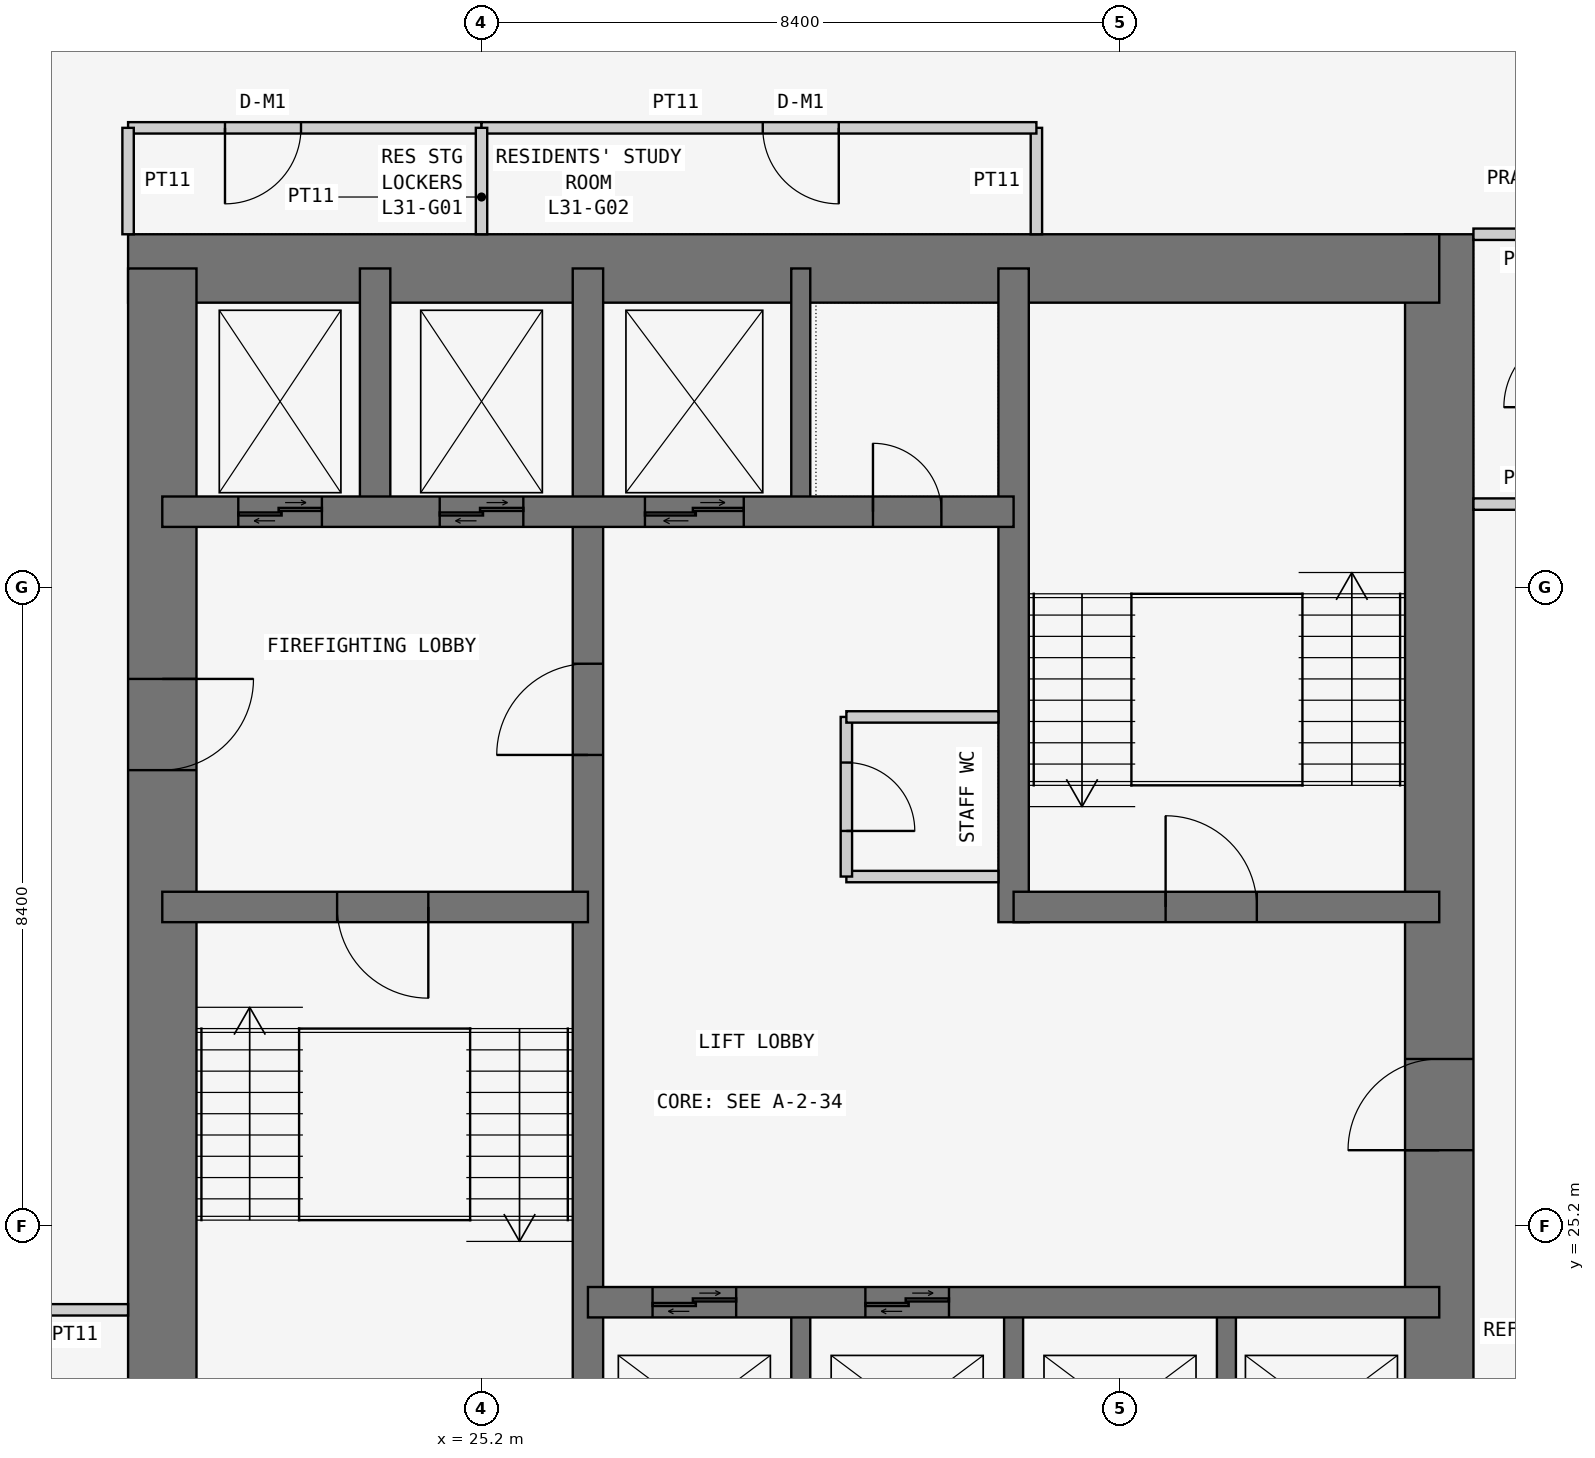
"""IFC4 building model, lengths in metres.
Left out: names, types, materials, properties, quantities, classifications, styles, units other than length and angle.
Written with IfcOpenShell. Run it as: python <this file> out.ifc"""

import sys

from ifc_helpers import new_model, si_unit, direction, frame, frame_2d, origin, place, context, subcontext, project, spatial, rectangle, extrude, element, fill, save


model = new_model("IFC4")
c1 = context("Model", 3, precision=1e-05, world=origin(), true_north=direction((0.0, 1.0)))
c2 = subcontext(c1, "Body", "Model", "MODEL_VIEW")
j1 = project(units=[si_unit("LENGTHUNIT", "METRE"), si_unit("PLANEANGLEUNIT", "RADIAN")], contexts=[c1])
p1 = place(None, origin())
s1 = spatial("IfcSite", under=j1, at=p1, CompositionType="ELEMENT")
p2 = place(p1, origin())
s2 = spatial("IfcBuilding", under=s1, at=p2, CompositionType="ELEMENT")
p3 = place(p2, frame((0.0, 0.0, 123.3)))
s3 = spatial("IfcBuildingStorey", under=s2, at=p3, CompositionType="ELEMENT", Elevation=123.3)
p4 = place(p3, frame((37.8, 21.0, 0.0), z_axis=(0.0, 0.0, 1.0), x_axis=(0.0, 1.0, 0.0)))
e1 = element("IfcWall", 1, at=p4, inside=s3, PredefinedType="SHEAR", context=c2, shape_type="SweptSolid", body=[
    extrude(rectangle(XDim=17.25, YDim=0.9, at=frame_2d((8.625, 0.0))), origin(), (0.0, 0.0, 1.0), 3.6),
])
p5 = place(p4, frame((5.2, 0.0, 0.0)))
e2 = element("IfcOpeningElement", 2, at=p5, cuts=e1, PredefinedType="OPENING", context=c2, shape_type="SweptSolid", body=[
    extrude(rectangle(XDim=1.2, YDim=2.1, at=frame_2d((0.6, 1.05))), frame((0.0, 0.46, 0.0), z_axis=(0.0, -1.0, 0.0), x_axis=(1.0, 0.0, 0.0)), (0.0, 0.0, 1.0), 0.92),
])
p6 = place(p3, frame((37.8, 37.8, 0.0), z_axis=(0.0, 0.0, 1.0), x_axis=(-1.0, 0.0, 0.0)))
e3 = element("IfcWall", 3, at=p6, inside=s3, PredefinedType="SHEAR", context=c2, shape_type="SweptSolid", body=[
    extrude(rectangle(XDim=17.25, YDim=0.9, at=frame_2d((8.625, 0.0))), origin(), (0.0, 0.0, 1.0), 3.6),
])
p7 = place(p3, frame((21.0, 37.8, 0.0), z_axis=(0.0, 0.0, 1.0), x_axis=(0.0, -1.0, 0.0)))
e4 = element("IfcWall", 4, at=p7, inside=s3, PredefinedType="SHEAR", context=c2, shape_type="SweptSolid", body=[
    extrude(rectangle(XDim=17.25, YDim=0.9, at=frame_2d((8.625, 0.0))), origin(), (0.0, 0.0, 1.0), 3.6),
])
p8 = place(p7, frame((5.4, 0.0, 0.0)))
e5 = element("IfcOpeningElement", 5, at=p8, cuts=e4, PredefinedType="OPENING", context=c2, shape_type="SweptSolid", body=[
    extrude(rectangle(XDim=1.2, YDim=2.1, at=frame_2d((0.6, 1.05))), frame((0.0, 0.46, 0.0), z_axis=(0.0, -1.0, 0.0), x_axis=(1.0, 0.0, 0.0)), (0.0, 0.0, 1.0), 0.92),
])
p9 = place(p3, frame((26.6, 21.0, 0.0), z_axis=(0.0, 0.0, 1.0), x_axis=(0.0, 1.0, 0.0)))
e6 = element("IfcWall", 6, at=p9, inside=s3, PredefinedType="SHEAR", context=c2, shape_type="SweptSolid", body=[
    extrude(rectangle(XDim=16.8, YDim=0.4, at=frame_2d((8.4, 0.0))), origin(), (0.0, 0.0, 1.0), 3.6),
])
p10 = place(p9, frame((10.4, 0.0, 0.0)))
e7 = element("IfcOpeningElement", 7, at=p10, cuts=e6, PredefinedType="OPENING", context=c2, shape_type="SweptSolid", body=[
    extrude(rectangle(XDim=1.2, YDim=2.1, at=frame_2d((0.6, 1.05))), frame((0.0, 0.21, 0.0), z_axis=(0.0, -1.0, 0.0), x_axis=(1.0, 0.0, 0.0)), (0.0, 0.0, 1.0), 0.42),
])
p11 = place(p3, frame((21.0, 29.4, 0.0), z_axis=(0.0, 0.0, 1.0), x_axis=(1.0, 0.0, 0.0)))
e8 = element("IfcWall", 8, at=p11, inside=s3, PredefinedType="SHEAR", context=c2, shape_type="SweptSolid", body=[
    extrude(rectangle(XDim=5.6, YDim=0.4, at=frame_2d((2.8, 0.0))), origin(), (0.0, 0.0, 1.0), 3.6),
])
p12 = place(p11, frame((2.3, 0.0, 0.0)))
e9 = element("IfcOpeningElement", 9, at=p12, cuts=e8, PredefinedType="OPENING", context=c2, shape_type="SweptSolid", body=[
    extrude(rectangle(XDim=1.2, YDim=2.1, at=frame_2d((0.6, 1.05))), frame((0.0, 0.21, 0.0), z_axis=(0.0, -1.0, 0.0), x_axis=(1.0, 0.0, 0.0)), (0.0, 0.0, 1.0), 0.42),
])
p13 = place(p3, frame((21.0, 34.6, 0.0), z_axis=(0.0, 0.0, 1.0), x_axis=(1.0, 0.0, 0.0)))
e10 = element("IfcWall", 10, at=p13, inside=s3, PredefinedType="SHEAR", context=c2, shape_type="SweptSolid", body=[
    extrude(rectangle(XDim=11.2, YDim=0.4, at=frame_2d((5.6, 0.0))), origin(), (0.0, 0.0, 1.0), 3.6),
])
p14 = place(p13, frame((9.35, 0.0, 0.0)))
e11 = element("IfcOpeningElement", 11, at=p14, cuts=e10, PredefinedType="OPENING", context=c2, shape_type="SweptSolid", body=[
    extrude(rectangle(XDim=0.9, YDim=2.1, at=frame_2d((0.45, 1.05))), frame((0.0, 0.21, 0.0), z_axis=(0.0, -1.0, 0.0), x_axis=(1.0, 0.0, 0.0)), (0.0, 0.0, 1.0), 0.42),
])
p15 = place(p13, frame((1.0, 0.0, 0.0)))
e12 = element("IfcOpeningElement", 12, at=p15, cuts=e10, PredefinedType="OPENING", context=c2, shape_type="SweptSolid", body=[
    extrude(rectangle(XDim=1.1, YDim=2.1, at=frame_2d((0.55, 1.05))), frame((0.0, 0.21, 0.0), z_axis=(0.0, -1.0, 0.0), x_axis=(1.0, 0.0, 0.0)), (0.0, 0.0, 1.0), 0.42),
])
p16 = place(p13, frame((3.65, 0.0, 0.0)))
e13 = element("IfcOpeningElement", 13, at=p16, cuts=e10, PredefinedType="OPENING", context=c2, shape_type="SweptSolid", body=[
    extrude(rectangle(XDim=1.1, YDim=2.1, at=frame_2d((0.55, 1.05))), frame((0.0, 0.21, 0.0), z_axis=(0.0, -1.0, 0.0), x_axis=(1.0, 0.0, 0.0)), (0.0, 0.0, 1.0), 0.42),
])
p17 = place(p13, frame((6.35, 0.0, 0.0)))
e14 = element("IfcOpeningElement", 14, at=p17, cuts=e10, PredefinedType="OPENING", context=c2, shape_type="SweptSolid", body=[
    extrude(rectangle(XDim=1.3, YDim=2.1, at=frame_2d((0.65, 1.05))), frame((0.0, 0.21, 0.0), z_axis=(0.0, -1.0, 0.0), x_axis=(1.0, 0.0, 0.0)), (0.0, 0.0, 1.0), 0.42),
])
p18 = place(p3, frame((23.8, 34.6, 0.0), z_axis=(0.0, 0.0, 1.0), x_axis=(0.0, 1.0, 0.0)))
e15 = element("IfcWall", 15, at=p18, inside=s3, PredefinedType="SHEAR", context=c2, shape_type="SweptSolid", body=[
    extrude(rectangle(XDim=3.2, YDim=0.4, at=frame_2d((1.6, 0.0))), origin(), (0.0, 0.0, 1.0), 3.6),
])
p19 = place(p3, frame((26.6, 24.2, 0.0), z_axis=(0.0, 0.0, 1.0), x_axis=(1.0, 0.0, 0.0)))
e16 = element("IfcWall", 16, at=p19, inside=s3, PredefinedType="SHEAR", context=c2, shape_type="SweptSolid", body=[
    extrude(rectangle(XDim=11.2, YDim=0.4, at=frame_2d((5.6, 0.0))), origin(), (0.0, 0.0, 1.0), 3.6),
])
p20 = place(p19, frame((0.85, 0.0, 0.0)))
e17 = element("IfcOpeningElement", 17, at=p20, cuts=e16, PredefinedType="OPENING", context=c2, shape_type="SweptSolid", body=[
    extrude(rectangle(XDim=1.1, YDim=2.1, at=frame_2d((0.55, 1.05))), frame((0.0, 0.21, 0.0), z_axis=(0.0, -1.0, 0.0), x_axis=(1.0, 0.0, 0.0)), (0.0, 0.0, 1.0), 0.42),
])
p21 = place(p19, frame((3.65, 0.0, 0.0)))
e18 = element("IfcOpeningElement", 18, at=p21, cuts=e16, PredefinedType="OPENING", context=c2, shape_type="SweptSolid", body=[
    extrude(rectangle(XDim=1.1, YDim=2.1, at=frame_2d((0.55, 1.05))), frame((0.0, 0.21, 0.0), z_axis=(0.0, -1.0, 0.0), x_axis=(1.0, 0.0, 0.0)), (0.0, 0.0, 1.0), 0.42),
])
p22 = place(p3, frame((32.2, 29.2, 0.0), z_axis=(0.0, 0.0, 1.0), x_axis=(0.0, 1.0, 0.0)))
e19 = element("IfcWall", 19, at=p22, inside=s3, PredefinedType="SHEAR", context=c2, shape_type="SweptSolid", body=[
    extrude(rectangle(XDim=8.6, YDim=0.4, at=frame_2d((4.3, 0.0))), origin(), (0.0, 0.0, 1.0), 3.6),
])
p23 = place(p3, frame((32.2, 29.4, 0.0), z_axis=(0.0, 0.0, 1.0), x_axis=(1.0, 0.0, 0.0)))
e20 = element("IfcWall", 20, at=p23, inside=s3, PredefinedType="SHEAR", context=c2, shape_type="SweptSolid", body=[
    extrude(rectangle(XDim=5.6, YDim=0.4, at=frame_2d((2.8, 0.0))), origin(), (0.0, 0.0, 1.0), 3.6),
])
p24 = place(p23, frame((2.0, 0.0, 0.0)))
e21 = element("IfcOpeningElement", 21, at=p24, cuts=e20, PredefinedType="OPENING", context=c2, shape_type="SweptSolid", body=[
    extrude(rectangle(XDim=1.2, YDim=2.1, at=frame_2d((0.6, 1.05))), frame((0.0, 0.21, 0.0), z_axis=(0.0, -1.0, 0.0), x_axis=(1.0, 0.0, 0.0)), (0.0, 0.0, 1.0), 0.42),
])
for number, where, z_axis, x_axis in (
    (22, (29.4, 21.0, 0.0), (0.0, 0.0, 1.0), (0.0, 1.0, 0.0)),
    (23, (32.2, 21.0, 0.0), (0.0, 0.0, 1.0), (0.0, 1.0, 0.0)),
    (24, (35.0, 21.0, 0.0), (0.0, 0.0, 1.0), (0.0, 1.0, 0.0)),
    (25, (29.4, 34.6, 0.0), (0.0, 0.0, 1.0), (0.0, 1.0, 0.0)),
):
    element("IfcWall", number, at=place(p3, frame(where, z_axis=z_axis, x_axis=x_axis)), inside=s3, PredefinedType="SHEAR", context=c2, shape_type="SweptSolid", body=[
        extrude(rectangle(XDim=3.2, YDim=0.25, at=frame_2d((1.6, 0.0))), origin(), (0.0, 0.0, 1.0), 3.6),
    ])
p25 = place(p3, frame((25.2, 39.65, 0.0), z_axis=(0.0, 0.0, 1.0), x_axis=(-1.0, 0.0, 0.0)))
e26 = element("IfcWall", 26, at=p25, inside=s3, PredefinedType="PARTITIONING", context=c2, shape_type="SweptSolid", body=[
    extrude(rectangle(XDim=4.65, YDim=0.15, at=frame_2d((2.325, 0.0))), origin(), (0.0, 0.0, 1.0), 3.45),
])
p26 = place(p25, frame((2.375, 0.0, 0.0)))
e27 = element("IfcOpeningElement", 27, at=p26, cuts=e26, PredefinedType="OPENING", context=c2, shape_type="SweptSolid", body=[
    extrude(rectangle(XDim=1.0, YDim=2.1, at=frame_2d((0.5, 1.05))), frame((0.0, 0.085, 0.0), z_axis=(0.0, -1.0, 0.0), x_axis=(1.0, 0.0, 0.0)), (0.0, 0.0, 1.0), 0.17),
])
for number, where, z_axis, x_axis in (
    (28, (20.55, 39.65, 0.0), (0.0, 0.0, 1.0), (0.0, -1.0, 0.0)),
    (29, (32.5, 38.25, 0.0), (0.0, 0.0, 1.0), (0.0, 1.0, 0.0)),
):
    element("IfcWall", number, at=place(p3, frame(where, z_axis=z_axis, x_axis=x_axis)), inside=s3, PredefinedType="PARTITIONING", context=c2, shape_type="SweptSolid", body=[
        extrude(rectangle(XDim=1.4, YDim=0.15, at=frame_2d((0.7, 0.0))), origin(), (0.0, 0.0, 1.0), 3.45),
    ])
p27 = place(p3, frame((32.5, 39.65, 0.0), z_axis=(0.0, 0.0, 1.0), x_axis=(-1.0, 0.0, 0.0)))
e30 = element("IfcWall", 30, at=p27, inside=s3, PredefinedType="PARTITIONING", context=c2, shape_type="SweptSolid", body=[
    extrude(rectangle(XDim=7.3, YDim=0.15, at=frame_2d((3.65, 0.0))), origin(), (0.0, 0.0, 1.0), 3.45),
])
p28 = place(p27, frame((2.6, 0.0, 0.0)))
e31 = element("IfcOpeningElement", 31, at=p28, cuts=e30, PredefinedType="OPENING", context=c2, shape_type="SweptSolid", body=[
    extrude(rectangle(XDim=1.0, YDim=2.1, at=frame_2d((0.5, 1.05))), frame((0.0, 0.085, 0.0), z_axis=(0.0, -1.0, 0.0), x_axis=(1.0, 0.0, 0.0)), (0.0, 0.0, 1.0), 0.17),
])
for number, where, z_axis, x_axis in (
    (32, (38.25, 34.7, 0.0), (0.0, 0.0, 1.0), (1.0, 0.0, 0.0)),
    (33, (39.65, 38.25, 0.0), (0.0, 0.0, 1.0), (-1.0, 0.0, 0.0)),
):
    element("IfcWall", number, at=place(p3, frame(where, z_axis=z_axis, x_axis=x_axis)), inside=s3, PredefinedType="PARTITIONING", context=c2, shape_type="SweptSolid", body=[
        extrude(rectangle(XDim=1.4, YDim=0.15, at=frame_2d((0.7, 0.0))), origin(), (0.0, 0.0, 1.0), 3.45),
    ])
p29 = place(p3, frame((20.55, 24.1, 0.0), z_axis=(0.0, 0.0, 1.0), x_axis=(-1.0, 0.0, 0.0)))
e34 = element("IfcWall", 34, at=p29, inside=s3, PredefinedType="PARTITIONING", context=c2, shape_type="SweptSolid", body=[
    extrude(rectangle(XDim=1.4, YDim=0.15, at=frame_2d((0.7, 0.0))), origin(), (0.0, 0.0, 1.0), 3.45),
])
p30 = place(p3, frame((25.2, 38.25, 0.0), z_axis=(0.0, 0.0, 1.0), x_axis=(0.0, 1.0, 0.0)))
e35 = element("IfcWall", 35, at=p30, inside=s3, PredefinedType="PARTITIONING", context=c2, shape_type="SweptSolid", body=[
    extrude(rectangle(XDim=1.4, YDim=0.15, at=frame_2d((0.7, 0.0))), origin(), (0.0, 0.0, 1.0), 2.767),
])
p31 = place(p3, frame((32.0, 29.8, 0.0), z_axis=(0.0, 0.0, 1.0), x_axis=(-1.0, 0.0, 0.0)))
e36 = element("IfcWall", 36, at=p31, inside=s3, PredefinedType="PARTITIONING", context=c2, shape_type="SweptSolid", body=[
    extrude(rectangle(XDim=2.0, YDim=0.15, at=frame_2d((1.0, 0.0))), origin(), (0.0, 0.0, 1.0), 3.45),
])
p32 = place(p3, frame((30.0, 29.8, 0.0), z_axis=(0.0, 0.0, 1.0), x_axis=(0.0, 1.0, 0.0)))
e37 = element("IfcWall", 37, at=p32, inside=s3, PredefinedType="PARTITIONING", context=c2, shape_type="SweptSolid", body=[
    extrude(rectangle(XDim=2.1, YDim=0.15, at=frame_2d((1.05, 0.0))), origin(), (0.0, 0.0, 1.0), 3.45),
])
p33 = place(p32, frame((0.6, 0.0, 0.0)))
e38 = element("IfcOpeningElement", 38, at=p33, cuts=e37, PredefinedType="OPENING", context=c2, shape_type="SweptSolid", body=[
    extrude(rectangle(XDim=0.9, YDim=2.1, at=frame_2d((0.45, 1.05))), frame((0.0, 0.085, 0.0), z_axis=(0.0, -1.0, 0.0), x_axis=(1.0, 0.0, 0.0)), (0.0, 0.0, 1.0), 0.17),
])
p34 = place(p3, frame((30.0, 31.9, 0.0), z_axis=(0.0, 0.0, 1.0), x_axis=(1.0, 0.0, 0.0)))
e39 = element("IfcWall", 39, at=p34, inside=s3, PredefinedType="PARTITIONING", context=c2, shape_type="SweptSolid", body=[
    extrude(rectangle(XDim=2.0, YDim=0.15, at=frame_2d((1.0, 0.0))), origin(), (0.0, 0.0, 1.0), 3.45),
])
p35 = place(p26, origin())
e40 = element("IfcDoor", 40, at=p35, inside=s3, OperationType="SINGLE_SWING_RIGHT", PredefinedType="DOOR", context=c2, shape_type="SweptSolid", body=[
    extrude(rectangle(XDim=1.0, YDim=2.1, at=frame_2d((0.5, 1.05))), frame((0.0, 0.025, 0.0), z_axis=(0.0, -1.0, 0.0), x_axis=(1.0, 0.0, 0.0)), (0.0, 0.0, 1.0), 0.05),
])
fill(e27, e40)
p36 = place(p28, origin())
e41 = element("IfcDoor", 41, at=p36, inside=s3, OperationType="SINGLE_SWING_LEFT", PredefinedType="DOOR", context=c2, shape_type="SweptSolid", body=[
    extrude(rectangle(XDim=1.0, YDim=2.1, at=frame_2d((0.5, 1.05))), frame((0.0, 0.025, 0.0), z_axis=(0.0, -1.0, 0.0), x_axis=(1.0, 0.0, 0.0)), (0.0, 0.0, 1.0), 0.05),
])
fill(e31, e41)
p37 = place(p8, origin())
e42 = element("IfcDoor", 42, at=p37, inside=s3, OperationType="SINGLE_SWING_LEFT", PredefinedType="DOOR", context=c2, shape_type="SweptSolid", body=[
    extrude(rectangle(XDim=1.2, YDim=2.1, at=frame_2d((0.6, 1.05))), frame((0.0, 0.025, 0.0), z_axis=(0.0, -1.0, 0.0), x_axis=(1.0, 0.0, 0.0)), (0.0, 0.0, 1.0), 0.05),
])
fill(e5, e42)
p38 = place(p12, frame((1.2, 0.0, 0.0), z_axis=(0.0, 0.0, 1.0), x_axis=(-1.0, 0.0, 0.0)))
e43 = element("IfcDoor", 43, at=p38, inside=s3, OperationType="SINGLE_SWING_LEFT", PredefinedType="DOOR", context=c2, shape_type="SweptSolid", body=[
    extrude(rectangle(XDim=1.2, YDim=2.1, at=frame_2d((0.6, 1.05))), frame((0.0, 0.025, 0.0), z_axis=(0.0, -1.0, 0.0), x_axis=(1.0, 0.0, 0.0)), (0.0, 0.0, 1.0), 0.05),
])
fill(e9, e43)
p39 = place(p10, origin())
e44 = element("IfcDoor", 44, at=p39, inside=s3, OperationType="SINGLE_SWING_LEFT", PredefinedType="DOOR", context=c2, shape_type="SweptSolid", body=[
    extrude(rectangle(XDim=1.2, YDim=2.1, at=frame_2d((0.6, 1.05))), frame((0.0, 0.025, 0.0), z_axis=(0.0, -1.0, 0.0), x_axis=(1.0, 0.0, 0.0)), (0.0, 0.0, 1.0), 0.05),
])
fill(e7, e44)
p40 = place(p5, origin())
e45 = element("IfcDoor", 45, at=p40, inside=s3, OperationType="SINGLE_SWING_LEFT", PredefinedType="DOOR", context=c2, shape_type="SweptSolid", body=[
    extrude(rectangle(XDim=1.2, YDim=2.1, at=frame_2d((0.6, 1.05))), frame((0.0, 0.025, 0.0), z_axis=(0.0, -1.0, 0.0), x_axis=(1.0, 0.0, 0.0)), (0.0, 0.0, 1.0), 0.05),
])
fill(e2, e45)
p41 = place(p24, origin())
e46 = element("IfcDoor", 46, at=p41, inside=s3, OperationType="SINGLE_SWING_LEFT", PredefinedType="DOOR", context=c2, shape_type="SweptSolid", body=[
    extrude(rectangle(XDim=1.2, YDim=2.1, at=frame_2d((0.6, 1.05))), frame((0.0, 0.025, 0.0), z_axis=(0.0, -1.0, 0.0), x_axis=(1.0, 0.0, 0.0)), (0.0, 0.0, 1.0), 0.05),
])
fill(e21, e46)
p42 = place(p14, origin())
e47 = element("IfcDoor", 47, at=p42, inside=s3, OperationType="SINGLE_SWING_LEFT", PredefinedType="DOOR", context=c2, shape_type="SweptSolid", body=[
    extrude(rectangle(XDim=0.9, YDim=2.1, at=frame_2d((0.45, 1.05))), frame((0.0, 0.025, 0.0), z_axis=(0.0, -1.0, 0.0), x_axis=(1.0, 0.0, 0.0)), (0.0, 0.0, 1.0), 0.05),
])
fill(e11, e47)
p43 = place(p33, frame((0.9, 0.0, 0.0), z_axis=(0.0, 0.0, 1.0), x_axis=(-1.0, 0.0, 0.0)))
e48 = element("IfcDoor", 48, at=p43, inside=s3, OperationType="SINGLE_SWING_RIGHT", PredefinedType="DOOR", context=c2, shape_type="SweptSolid", body=[
    extrude(rectangle(XDim=0.9, YDim=2.1, at=frame_2d((0.45, 1.05))), frame((0.0, 0.025, 0.0), z_axis=(0.0, -1.0, 0.0), x_axis=(1.0, 0.0, 0.0)), (0.0, 0.0, 1.0), 0.05),
])
fill(e38, e48)
p44 = place(p20, origin())
e49 = element("IfcDoor", 49, at=p44, inside=s3, OperationType="DOUBLE_DOOR_SLIDING", PredefinedType="DOOR", context=c2, shape_type="SweptSolid", body=[
    extrude(rectangle(XDim=1.1, YDim=2.1, at=frame_2d((0.55, 1.05))), frame((0.0, 0.025, 0.0), z_axis=(0.0, -1.0, 0.0), x_axis=(1.0, 0.0, 0.0)), (0.0, 0.0, 1.0), 0.05),
])
fill(e17, e49)
p45 = place(p21, origin())
e50 = element("IfcDoor", 50, at=p45, inside=s3, OperationType="DOUBLE_DOOR_SLIDING", PredefinedType="DOOR", context=c2, shape_type="SweptSolid", body=[
    extrude(rectangle(XDim=1.1, YDim=2.1, at=frame_2d((0.55, 1.05))), frame((0.0, 0.025, 0.0), z_axis=(0.0, -1.0, 0.0), x_axis=(1.0, 0.0, 0.0)), (0.0, 0.0, 1.0), 0.05),
])
fill(e18, e50)
p46 = place(p15, origin())
e51 = element("IfcDoor", 51, at=p46, inside=s3, OperationType="DOUBLE_DOOR_SLIDING", PredefinedType="DOOR", context=c2, shape_type="SweptSolid", body=[
    extrude(rectangle(XDim=1.1, YDim=2.1, at=frame_2d((0.55, 1.05))), frame((0.0, 0.025, 0.0), z_axis=(0.0, -1.0, 0.0), x_axis=(1.0, 0.0, 0.0)), (0.0, 0.0, 1.0), 0.05),
])
fill(e12, e51)
p47 = place(p16, origin())
e52 = element("IfcDoor", 52, at=p47, inside=s3, OperationType="DOUBLE_DOOR_SLIDING", PredefinedType="DOOR", context=c2, shape_type="SweptSolid", body=[
    extrude(rectangle(XDim=1.1, YDim=2.1, at=frame_2d((0.55, 1.05))), frame((0.0, 0.025, 0.0), z_axis=(0.0, -1.0, 0.0), x_axis=(1.0, 0.0, 0.0)), (0.0, 0.0, 1.0), 0.05),
])
fill(e13, e52)
p48 = place(p17, origin())
e53 = element("IfcDoor", 53, at=p48, inside=s3, OperationType="DOUBLE_DOOR_SLIDING", PredefinedType="DOOR", context=c2, shape_type="SweptSolid", body=[
    extrude(rectangle(XDim=1.3, YDim=2.1, at=frame_2d((0.65, 1.05))), frame((0.0, 0.025, 0.0), z_axis=(0.0, -1.0, 0.0), x_axis=(1.0, 0.0, 0.0)), (0.0, 0.0, 1.0), 0.05),
])
fill(e14, e53)
save(model, sys.argv[1])
